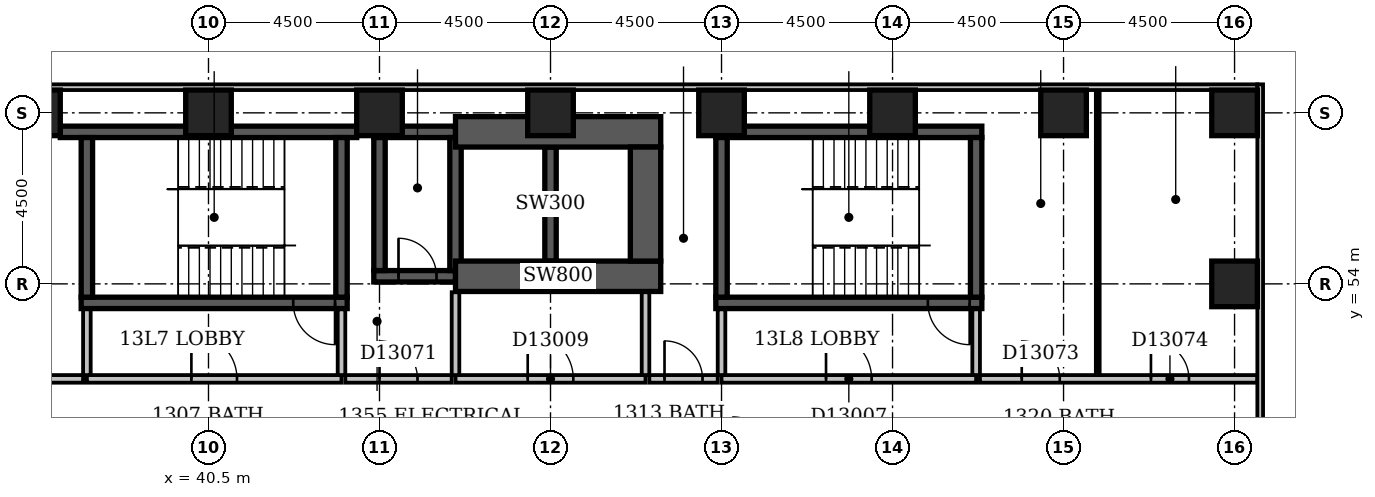
"""IFC4 building model, lengths in metres.
Left out: names, types, materials, properties, quantities, classifications, styles, units other than length and angle.
Written with IfcOpenShell. Run it as: python <this file> out.ifc"""

import sys

from ifc_helpers import new_model, si_unit, direction, frame, frame_2d, origin, origin_2d, place, context, subcontext, project, spatial, rectangle, extrude, element, fill, save


model = new_model("IFC4")
c1 = context("Model", 3, precision=1e-05, world=origin(), true_north=direction((0.0, 1.0)))
c2 = subcontext(c1, "Body", "Model", "MODEL_VIEW")
j1 = project(units=[si_unit("LENGTHUNIT", "METRE"), si_unit("PLANEANGLEUNIT", "RADIAN")], contexts=[c1])
p1 = place(None, origin())
s1 = spatial("IfcSite", under=j1, at=p1, CompositionType="ELEMENT")
p2 = place(p1, origin())
s2 = spatial("IfcBuilding", under=s1, at=p2, CompositionType="ELEMENT")
p3 = place(p2, frame((0.0, 0.0, 57.8)))
s3 = spatial("IfcBuildingStorey", under=s2, at=p3, CompositionType="ELEMENT", Elevation=57.8)
p4 = place(p3, frame((36.6, 58.0, -0.3), z_axis=(0.0, 0.0, 1.0), x_axis=(1.0, 0.0, 0.0)))
e1 = element("IfcWall", 1, at=p4, inside=s3, PredefinedType="SHEAR", context=c2, shape_type="SweptSolid", body=[
    extrude(rectangle(XDim=7.8, YDim=0.3, at=frame_2d((3.9, 0.0))), origin(), (0.0, 0.0, 1.0), 3.6),
])
p5 = place(p3, frame((37.15, 53.5, -0.3), z_axis=(0.0, 0.0, 1.0), x_axis=(1.0, 0.0, 0.0)))
e2 = element("IfcWall", 2, at=p5, inside=s3, PredefinedType="SHEAR", context=c2, shape_type="SweptSolid", body=[
    extrude(rectangle(XDim=7.0, YDim=0.3, at=frame_2d((3.5, 0.0))), origin(), (0.0, 0.0, 1.0), 3.6),
])
p6 = place(p5, frame((5.58, 0.0, 0.3)))
e3 = element("IfcOpeningElement", 3, at=p6, cuts=e2, PredefinedType="OPENING", context=c2, shape_type="SweptSolid", body=[
    extrude(rectangle(XDim=1.1, YDim=2.1, at=frame_2d((0.55, 1.05))), frame((0.0, 0.162, 0.0), z_axis=(0.0, -1.0, 0.0), x_axis=(1.0, 0.0, 0.0)), (0.0, 0.0, 1.0), 0.324),
])
for number, where, z_axis, x_axis in (
    (4, (37.3, 53.65, -0.3), (0.0, 0.0, 1.0), (0.0, 1.0, 0.0)),
    (5, (44.0, 53.65, -0.3), (0.0, 0.0, 1.0), (0.0, 1.0, 0.0)),
):
    element("IfcWall", number, at=place(p3, frame(where, z_axis=z_axis, x_axis=x_axis)), inside=s3, PredefinedType="SHEAR", context=c2, shape_type="SweptSolid", body=[
        extrude(rectangle(XDim=4.2, YDim=0.3, at=frame_2d((2.1, 0.0))), origin(), (0.0, 0.0, 1.0), 3.6),
    ])
p7 = place(p3, frame((44.85, 54.2, -0.3), z_axis=(0.0, 0.0, 1.0), x_axis=(1.0, 0.0, 0.0)))
e6 = element("IfcWall", 6, at=p7, inside=s3, PredefinedType="SHEAR", context=c2, shape_type="SweptSolid", body=[
    extrude(rectangle(XDim=2.15, YDim=0.3, at=frame_2d((1.075, 0.0))), origin(), (0.0, 0.0, 1.0), 3.6),
])
p8 = place(p7, frame((0.65, 0.0, 0.3)))
e7 = element("IfcOpeningElement", 7, at=p8, cuts=e6, PredefinedType="OPENING", context=c2, shape_type="SweptSolid", body=[
    extrude(rectangle(XDim=1.0, YDim=2.1, at=frame_2d((0.5, 1.05))), frame((0.0, 0.162, 0.0), z_axis=(0.0, -1.0, 0.0), x_axis=(1.0, 0.0, 0.0)), (0.0, 0.0, 1.0), 0.324),
])
p9 = place(p3, frame((44.85, 58.0, -0.3), z_axis=(0.0, 0.0, 1.0), x_axis=(1.0, 0.0, 0.0)))
e8 = element("IfcWall", 8, at=p9, inside=s3, PredefinedType="SHEAR", context=c2, shape_type="SweptSolid", body=[
    extrude(rectangle(XDim=2.15, YDim=0.3, at=frame_2d((1.075, 0.0))), origin(), (0.0, 0.0, 1.0), 3.6),
])
p10 = place(p3, frame((45.0, 54.35, -0.3), z_axis=(0.0, 0.0, 1.0), x_axis=(0.0, 1.0, 0.0)))
e9 = element("IfcWall", 9, at=p10, inside=s3, PredefinedType="SHEAR", context=c2, shape_type="SweptSolid", body=[
    extrude(rectangle(XDim=3.5, YDim=0.3, at=frame_2d((1.75, 0.0))), origin(), (0.0, 0.0, 1.0), 3.6),
])
p11 = place(p3, frame((47.0, 54.2, -0.3), z_axis=(0.0, 0.0, 1.0), x_axis=(1.0, 0.0, 0.0)))
e10 = element("IfcWall", 10, at=p11, inside=s3, PredefinedType="SHEAR", context=c2, shape_type="SweptSolid", body=[
    extrude(rectangle(XDim=5.4, YDim=0.8, at=frame_2d((2.7, 0.0))), origin(), (0.0, 0.0, 1.0), 3.6),
])
p12 = place(p3, frame((47.0, 54.35, -0.3), z_axis=(0.0, 0.0, 1.0), x_axis=(0.0, 1.0, 0.0)))
e11 = element("IfcWall", 11, at=p12, inside=s3, PredefinedType="SHEAR", context=c2, shape_type="SweptSolid", body=[
    extrude(rectangle(XDim=3.5, YDim=0.3, at=frame_2d((1.75, 0.0))), origin(), (0.0, 0.0, 1.0), 3.6),
])
p13 = place(p3, frame((47.0, 58.0, -0.3), z_axis=(0.0, 0.0, 1.0), x_axis=(1.0, 0.0, 0.0)))
e12 = element("IfcWall", 12, at=p13, inside=s3, PredefinedType="SHEAR", context=c2, shape_type="SweptSolid", body=[
    extrude(rectangle(XDim=5.4, YDim=0.8, at=frame_2d((2.7, 0.0))), origin(), (0.0, 0.0, 1.0), 3.6),
])
p14 = place(p3, frame((49.5, 54.6, -0.3), z_axis=(0.0, 0.0, 1.0), x_axis=(0.0, 1.0, 0.0)))
e13 = element("IfcWall", 13, at=p14, inside=s3, PredefinedType="SHEAR", context=c2, shape_type="SweptSolid", body=[
    extrude(rectangle(XDim=3.0, YDim=0.3, at=frame_2d((1.5, 0.0))), origin(), (0.0, 0.0, 1.0), 3.6),
])
p15 = place(p3, frame((52.0, 54.6, -0.3), z_axis=(0.0, 0.0, 1.0), x_axis=(0.0, 1.0, 0.0)))
e14 = element("IfcWall", 14, at=p15, inside=s3, PredefinedType="SHEAR", context=c2, shape_type="SweptSolid", body=[
    extrude(rectangle(XDim=3.0, YDim=0.8, at=frame_2d((1.5, 0.0))), origin(), (0.0, 0.0, 1.0), 3.6),
])
p16 = place(p3, frame((53.85, 53.5, -0.3), z_axis=(0.0, 0.0, 1.0), x_axis=(1.0, 0.0, 0.0)))
e15 = element("IfcWall", 15, at=p16, inside=s3, PredefinedType="SHEAR", context=c2, shape_type="SweptSolid", body=[
    extrude(rectangle(XDim=7.0, YDim=0.3, at=frame_2d((3.5, 0.0))), origin(), (0.0, 0.0, 1.0), 3.6),
])
p17 = place(p16, frame((5.58, 0.0, 0.3)))
e16 = element("IfcOpeningElement", 16, at=p17, cuts=e15, PredefinedType="OPENING", context=c2, shape_type="SweptSolid", body=[
    extrude(rectangle(XDim=1.1, YDim=2.1, at=frame_2d((0.55, 1.05))), frame((0.0, 0.162, 0.0), z_axis=(0.0, -1.0, 0.0), x_axis=(1.0, 0.0, 0.0)), (0.0, 0.0, 1.0), 0.324),
])
p18 = place(p3, frame((53.85, 58.0, -0.3), z_axis=(0.0, 0.0, 1.0), x_axis=(1.0, 0.0, 0.0)))
e17 = element("IfcWall", 17, at=p18, inside=s3, PredefinedType="SHEAR", context=c2, shape_type="SweptSolid", body=[
    extrude(rectangle(XDim=7.0, YDim=0.3, at=frame_2d((3.5, 0.0))), origin(), (0.0, 0.0, 1.0), 3.6),
])
for number, where, z_axis, x_axis in (
    (18, (54.0, 53.65, -0.3), (0.0, 0.0, 1.0), (0.0, 1.0, 0.0)),
    (19, (60.7, 53.65, -0.3), (0.0, 0.0, 1.0), (0.0, 1.0, 0.0)),
):
    element("IfcWall", number, at=place(p3, frame(where, z_axis=z_axis, x_axis=x_axis)), inside=s3, PredefinedType="SHEAR", context=c2, shape_type="SweptSolid", body=[
        extrude(rectangle(XDim=4.2, YDim=0.3, at=frame_2d((2.1, 0.0))), origin(), (0.0, 0.0, 1.0), 3.6),
    ])
for number, where, z_axis, x_axis in (
    (20, (67.5, 54.0, -0.3), (0.0, 0.0, 1.0), (1.0, 0.0, 0.0)),
    (21, (36.0, 58.5, -0.3), (0.0, 0.0, 1.0), (1.0, 0.0, 0.0)),
    (22, (40.5, 58.5, -0.3), (0.0, 0.0, 1.0), (1.0, 0.0, 0.0)),
    (23, (45.0, 58.5, -0.3), (0.0, 0.0, 1.0), (1.0, 0.0, 0.0)),
    (24, (49.5, 58.5, -0.3), (0.0, 0.0, 1.0), (1.0, 0.0, 0.0)),
    (25, (54.0, 58.5, -0.3), (0.0, 0.0, 1.0), (1.0, 0.0, 0.0)),
    (26, (58.5, 58.5, -0.3), (0.0, 0.0, 1.0), (1.0, 0.0, 0.0)),
    (27, (63.0, 58.5, -0.3), (0.0, 0.0, 1.0), (1.0, 0.0, 0.0)),
    (28, (67.5, 58.5, -0.3), (0.0, 0.0, 1.0), (1.0, 0.0, 0.0)),
):
    element("IfcColumn", number, at=place(p3, frame(where, z_axis=z_axis, x_axis=x_axis)), inside=s3, PredefinedType="COLUMN", context=c2, shape_type="SweptSolid", body=[
        extrude(rectangle(XDim=1.2, YDim=1.2, at=origin_2d()), origin(), (0.0, 0.0, 1.0), 3.6),
    ])
p19 = place(p3, frame((68.175, 35.4, 0.0), z_axis=(0.0, 0.0, 1.0), x_axis=(0.0, 1.0, 0.0)))
e29 = element("IfcWall", 29, at=p19, inside=s3, PredefinedType="STANDARD", context=c2, shape_type="SweptSolid", body=[
    extrude(rectangle(XDim=23.85, YDim=0.15, at=frame_2d((11.925, 0.0))), origin(), (0.0, 0.0, 1.0), 2.7),
])
p20 = place(p19, frame((1.65, 0.0, 0.6)))
e30 = element("IfcOpeningElement", 30, at=p20, cuts=e29, PredefinedType="OPENING", context=c2, shape_type="SweptSolid", body=[
    extrude(rectangle(XDim=2.4, YDim=1.8, at=frame_2d((1.2, 0.9))), frame((0.0, 0.087, 0.0), z_axis=(0.0, -1.0, 0.0), x_axis=(1.0, 0.0, 0.0)), (0.0, 0.0, 1.0), 0.174),
])
p21 = place(p19, frame((7.477, 0.0, 0.6)))
e31 = element("IfcOpeningElement", 31, at=p21, cuts=e29, PredefinedType="OPENING", context=c2, shape_type="SweptSolid", body=[
    extrude(rectangle(XDim=1.2, YDim=1.8, at=frame_2d((0.6, 0.9))), frame((0.0, 0.087, 0.0), z_axis=(0.0, -1.0, 0.0), x_axis=(1.0, 0.0, 0.0)), (0.0, 0.0, 1.0), 0.174),
])
p22 = place(p3, frame((68.1, 59.175, 0.0), z_axis=(0.0, 0.0, 1.0), x_axis=(-1.0, 0.0, 0.0)))
e32 = element("IfcWall", 32, at=p22, inside=s3, PredefinedType="STANDARD", context=c2, shape_type="SweptSolid", body=[
    extrude(rectangle(XDim=68.85, YDim=0.15, at=frame_2d((34.425, 0.0))), origin(), (0.0, 0.0, 1.0), 2.7),
])
p23 = place(p22, frame((37.65, 0.0, 0.6)))
e33 = element("IfcOpeningElement", 33, at=p23, cuts=e32, PredefinedType="OPENING", context=c2, shape_type="SweptSolid", body=[
    extrude(rectangle(XDim=2.4, YDim=1.8, at=frame_2d((1.2, 0.9))), frame((0.0, 0.087, 0.0), z_axis=(0.0, -1.0, 0.0), x_axis=(1.0, 0.0, 0.0)), (0.0, 0.0, 1.0), 0.174),
])
p24 = place(p3, frame((47.0, 51.5, 0.0), z_axis=(0.0, 0.0, 1.0), x_axis=(1.0, 0.0, 0.0)))
e34 = element("IfcWall", 34, at=p24, inside=s3, PredefinedType="PARTITIONING", context=c2, shape_type="SweptSolid", body=[
    extrude(rectangle(XDim=5.0, YDim=0.2, at=frame_2d((2.5, 0.0))), origin(), (0.0, 0.0, 1.0), 3.3),
])
p25 = place(p24, frame((1.9, 0.0, 0.0)))
e35 = element("IfcOpeningElement", 35, at=p25, cuts=e34, PredefinedType="OPENING", context=c2, shape_type="SweptSolid", body=[
    extrude(rectangle(XDim=1.2, YDim=2.1, at=frame_2d((0.6, 1.05))), frame((0.0, 0.112, 0.0), z_axis=(0.0, -1.0, 0.0), x_axis=(1.0, 0.0, 0.0)), (0.0, 0.0, 1.0), 0.224),
])
for number, where, z_axis, x_axis in (
    (36, (52.0, 51.6, 0.0), (0.0, 0.0, 1.0), (0.0, 1.0, 0.0)),
    (37, (47.0, 51.6, 0.0), (0.0, 0.0, 1.0), (0.0, 1.0, 0.0)),
):
    element("IfcWall", number, at=place(p3, frame(where, z_axis=z_axis, x_axis=x_axis)), inside=s3, PredefinedType="PARTITIONING", context=c2, shape_type="SweptSolid", body=[
        extrude(rectangle(XDim=2.18, YDim=0.2, at=frame_2d((1.09, 0.0))), origin(), (0.0, 0.0, 1.0), 3.3),
    ])
p26 = place(p3, frame((37.3, 51.5, 0.0), z_axis=(0.0, 0.0, 1.0), x_axis=(1.0, 0.0, 0.0)))
e38 = element("IfcWall", 38, at=p26, inside=s3, PredefinedType="PARTITIONING", context=c2, shape_type="SweptSolid", body=[
    extrude(rectangle(XDim=6.7, YDim=0.2, at=frame_2d((3.35, 0.0))), origin(), (0.0, 0.0, 1.0), 3.3),
])
p27 = place(p26, frame((2.75, 0.0, 0.0)))
e39 = element("IfcOpeningElement", 39, at=p27, cuts=e38, PredefinedType="OPENING", context=c2, shape_type="SweptSolid", body=[
    extrude(rectangle(XDim=1.2, YDim=2.1, at=frame_2d((0.6, 1.05))), frame((0.0, 0.112, 0.0), z_axis=(0.0, -1.0, 0.0), x_axis=(1.0, 0.0, 0.0)), (0.0, 0.0, 1.0), 0.224),
])
for number, where, z_axis, x_axis in (
    (40, (44.0, 51.6, 0.0), (0.0, 0.0, 1.0), (0.0, 1.0, 0.0)),
    (41, (37.3, 51.6, 0.0), (0.0, 0.0, 1.0), (0.0, 1.0, 0.0)),
):
    element("IfcWall", number, at=place(p3, frame(where, z_axis=z_axis, x_axis=x_axis)), inside=s3, PredefinedType="PARTITIONING", context=c2, shape_type="SweptSolid", body=[
        extrude(rectangle(XDim=1.73, YDim=0.2, at=frame_2d((0.865, 0.0))), origin(), (0.0, 0.0, 1.0), 3.3),
    ])
p28 = place(p3, frame((54.0, 51.5, 0.0), z_axis=(0.0, 0.0, 1.0), x_axis=(1.0, 0.0, 0.0)))
e42 = element("IfcWall", 42, at=p28, inside=s3, PredefinedType="PARTITIONING", context=c2, shape_type="SweptSolid", body=[
    extrude(rectangle(XDim=6.7, YDim=0.2, at=frame_2d((3.35, 0.0))), origin(), (0.0, 0.0, 1.0), 3.3),
])
p29 = place(p28, frame((2.75, 0.0, 0.0)))
e43 = element("IfcOpeningElement", 43, at=p29, cuts=e42, PredefinedType="OPENING", context=c2, shape_type="SweptSolid", body=[
    extrude(rectangle(XDim=1.2, YDim=2.1, at=frame_2d((0.6, 1.05))), frame((0.0, 0.112, 0.0), z_axis=(0.0, -1.0, 0.0), x_axis=(1.0, 0.0, 0.0)), (0.0, 0.0, 1.0), 0.224),
])
p30 = place(p3, frame((60.7, 51.6, 0.0), z_axis=(0.0, 0.0, 1.0), x_axis=(0.0, 1.0, 0.0)))
e44 = element("IfcWall", 44, at=p30, inside=s3, PredefinedType="PARTITIONING", context=c2, shape_type="SweptSolid", body=[
    extrude(rectangle(XDim=1.73, YDim=0.2, at=frame_2d((0.865, 0.0))), origin(), (0.0, 0.0, 1.0), 3.3),
])
p31 = place(p3, frame((54.0, 51.6, 0.0), z_axis=(0.0, 0.0, 1.0), x_axis=(0.0, 1.0, 0.0)))
e45 = element("IfcWall", 45, at=p31, inside=s3, PredefinedType="PARTITIONING", context=c2, shape_type="SweptSolid", body=[
    extrude(rectangle(XDim=1.73, YDim=0.2, at=frame_2d((0.865, 0.0))), origin(), (0.0, 0.0, 1.0), 2.6),
])
p32 = place(p3, frame((27.9, 51.5, 0.0), z_axis=(0.0, 0.0, 1.0), x_axis=(1.0, 0.0, 0.0)))
e46 = element("IfcWall", 46, at=p32, inside=s3, PredefinedType="PARTITIONING", context=c2, shape_type="SweptSolid", body=[
    extrude(rectangle(XDim=9.3, YDim=0.2, at=frame_2d((4.65, 0.0))), origin(), (0.0, 0.0, 1.0), 3.3),
])
p33 = place(p32, frame((4.2, 0.0, 0.0)))
e47 = element("IfcOpeningElement", 47, at=p33, cuts=e46, PredefinedType="OPENING", context=c2, shape_type="SweptSolid", body=[
    extrude(rectangle(XDim=0.9, YDim=2.1, at=frame_2d((0.45, 1.05))), frame((0.0, 0.112, 0.0), z_axis=(0.0, -1.0, 0.0), x_axis=(1.0, 0.0, 0.0)), (0.0, 0.0, 1.0), 0.224),
])
p34 = place(p3, frame((44.1, 51.5, 0.0), z_axis=(0.0, 0.0, 1.0), x_axis=(1.0, 0.0, 0.0)))
e48 = element("IfcWall", 48, at=p34, inside=s3, PredefinedType="PARTITIONING", context=c2, shape_type="SweptSolid", body=[
    extrude(rectangle(XDim=2.8, YDim=0.2, at=frame_2d((1.4, 0.0))), origin(), (0.0, 0.0, 1.0), 3.3),
])
p35 = place(p34, frame((0.9, 0.0, 0.0)))
e49 = element("IfcOpeningElement", 49, at=p35, cuts=e48, PredefinedType="OPENING", context=c2, shape_type="SweptSolid", body=[
    extrude(rectangle(XDim=1.0, YDim=2.1, at=frame_2d((0.5, 1.05))), frame((0.0, 0.112, 0.0), z_axis=(0.0, -1.0, 0.0), x_axis=(1.0, 0.0, 0.0)), (0.0, 0.0, 1.0), 0.224),
])
p36 = place(p3, frame((52.1, 51.5, 0.0), z_axis=(0.0, 0.0, 1.0), x_axis=(1.0, 0.0, 0.0)))
e50 = element("IfcWall", 50, at=p36, inside=s3, PredefinedType="PARTITIONING", context=c2, shape_type="SweptSolid", body=[
    extrude(rectangle(XDim=1.8, YDim=0.2, at=frame_2d((0.9, 0.0))), origin(), (0.0, 0.0, 1.0), 3.3),
])
p37 = place(p36, frame((0.4, 0.0, 0.0)))
e51 = element("IfcOpeningElement", 51, at=p37, cuts=e50, PredefinedType="OPENING", context=c2, shape_type="SweptSolid", body=[
    extrude(rectangle(XDim=1.0, YDim=2.1, at=frame_2d((0.5, 1.05))), frame((0.0, 0.112, 0.0), z_axis=(0.0, -1.0, 0.0), x_axis=(1.0, 0.0, 0.0)), (0.0, 0.0, 1.0), 0.224),
])
p38 = place(p3, frame((60.8, 51.5, 0.0), z_axis=(0.0, 0.0, 1.0), x_axis=(1.0, 0.0, 0.0)))
e52 = element("IfcWall", 52, at=p38, inside=s3, PredefinedType="PARTITIONING", context=c2, shape_type="SweptSolid", body=[
    extrude(rectangle(XDim=7.3, YDim=0.2, at=frame_2d((3.65, 0.0))), origin(), (0.0, 0.0, 1.0), 3.3),
])
p39 = place(p38, frame((1.1, 0.0, 0.0)))
e53 = element("IfcOpeningElement", 53, at=p39, cuts=e52, PredefinedType="OPENING", context=c2, shape_type="SweptSolid", body=[
    extrude(rectangle(XDim=1.0, YDim=2.1, at=frame_2d((0.5, 1.05))), frame((0.0, 0.112, 0.0), z_axis=(0.0, -1.0, 0.0), x_axis=(1.0, 0.0, 0.0)), (0.0, 0.0, 1.0), 0.224),
])
p40 = place(p38, frame((4.5, 0.0, 0.0)))
e54 = element("IfcOpeningElement", 54, at=p40, cuts=e52, PredefinedType="OPENING", context=c2, shape_type="SweptSolid", body=[
    extrude(rectangle(XDim=1.0, YDim=2.1, at=frame_2d((0.5, 1.05))), frame((0.0, 0.112, 0.0), z_axis=(0.0, -1.0, 0.0), x_axis=(1.0, 0.0, 0.0)), (0.0, 0.0, 1.0), 0.224),
])
p41 = place(p3, frame((63.9, 51.6, 0.0), z_axis=(0.0, 0.0, 1.0), x_axis=(0.0, 1.0, 0.0)))
e55 = element("IfcWall", 55, at=p41, inside=s3, PredefinedType="PARTITIONING", context=c2, shape_type="SweptSolid", body=[
    extrude(rectangle(XDim=7.5, YDim=0.1, at=frame_2d((3.75, 0.0))), origin(), (0.0, 0.0, 1.0), 3.3),
])
p42 = place(p27, origin())
e56 = element("IfcDoor", 56, at=p42, inside=s3, OperationType="SINGLE_SWING_LEFT", PredefinedType="DOOR", context=c2, shape_type="SweptSolid", body=[
    extrude(rectangle(XDim=1.2, YDim=2.1, at=frame_2d((0.6, 1.05))), frame((0.0, 0.025, 0.0), z_axis=(0.0, -1.0, 0.0), x_axis=(1.0, 0.0, 0.0)), (0.0, 0.0, 1.0), 0.05),
])
fill(e39, e56)
p43 = place(p29, origin())
e57 = element("IfcDoor", 57, at=p43, inside=s3, OperationType="SINGLE_SWING_LEFT", PredefinedType="DOOR", context=c2, shape_type="SweptSolid", body=[
    extrude(rectangle(XDim=1.2, YDim=2.1, at=frame_2d((0.6, 1.05))), frame((0.0, 0.025, 0.0), z_axis=(0.0, -1.0, 0.0), x_axis=(1.0, 0.0, 0.0)), (0.0, 0.0, 1.0), 0.05),
])
fill(e43, e57)
p44 = place(p25, origin())
e58 = element("IfcDoor", 58, at=p44, inside=s3, OperationType="SINGLE_SWING_LEFT", PredefinedType="DOOR", context=c2, shape_type="SweptSolid", body=[
    extrude(rectangle(XDim=1.2, YDim=2.1, at=frame_2d((0.6, 1.05))), frame((0.0, 0.025, 0.0), z_axis=(0.0, -1.0, 0.0), x_axis=(1.0, 0.0, 0.0)), (0.0, 0.0, 1.0), 0.05),
])
fill(e35, e58)
p45 = place(p8, origin())
e59 = element("IfcDoor", 59, at=p45, inside=s3, OperationType="SINGLE_SWING_LEFT", PredefinedType="DOOR", context=c2, shape_type="SweptSolid", body=[
    extrude(rectangle(XDim=1.0, YDim=2.1, at=frame_2d((0.5, 1.05))), frame((0.0, 0.025, 0.0), z_axis=(0.0, -1.0, 0.0), x_axis=(1.0, 0.0, 0.0)), (0.0, 0.0, 1.0), 0.05),
])
fill(e7, e59)
p46 = place(p6, origin())
e60 = element("IfcDoor", 60, at=p46, inside=s3, OperationType="SINGLE_SWING_RIGHT", PredefinedType="DOOR", context=c2, shape_type="SweptSolid", body=[
    extrude(rectangle(XDim=1.1, YDim=2.1, at=frame_2d((0.55, 1.05))), frame((0.0, 0.025, 0.0), z_axis=(0.0, -1.0, 0.0), x_axis=(1.0, 0.0, 0.0)), (0.0, 0.0, 1.0), 0.05),
])
fill(e3, e60)
p47 = place(p17, origin())
e61 = element("IfcDoor", 61, at=p47, inside=s3, OperationType="SINGLE_SWING_RIGHT", PredefinedType="DOOR", context=c2, shape_type="SweptSolid", body=[
    extrude(rectangle(XDim=1.1, YDim=2.1, at=frame_2d((0.55, 1.05))), frame((0.0, 0.025, 0.0), z_axis=(0.0, -1.0, 0.0), x_axis=(1.0, 0.0, 0.0)), (0.0, 0.0, 1.0), 0.05),
])
fill(e16, e61)
p48 = place(p35, origin())
e62 = element("IfcDoor", 62, at=p48, inside=s3, OperationType="SINGLE_SWING_LEFT", PredefinedType="DOOR", context=c2, shape_type="SweptSolid", body=[
    extrude(rectangle(XDim=1.0, YDim=2.1, at=frame_2d((0.5, 1.05))), frame((0.0, 0.025, 0.0), z_axis=(0.0, -1.0, 0.0), x_axis=(1.0, 0.0, 0.0)), (0.0, 0.0, 1.0), 0.05),
])
fill(e49, e62)
p49 = place(p37, origin())
e63 = element("IfcDoor", 63, at=p49, inside=s3, OperationType="SINGLE_SWING_LEFT", PredefinedType="DOOR", context=c2, shape_type="SweptSolid", body=[
    extrude(rectangle(XDim=1.0, YDim=2.1, at=frame_2d((0.5, 1.05))), frame((0.0, 0.025, 0.0), z_axis=(0.0, -1.0, 0.0), x_axis=(1.0, 0.0, 0.0)), (0.0, 0.0, 1.0), 0.05),
])
fill(e51, e63)
p50 = place(p39, origin())
e64 = element("IfcDoor", 64, at=p50, inside=s3, OperationType="SINGLE_SWING_LEFT", PredefinedType="DOOR", context=c2, shape_type="SweptSolid", body=[
    extrude(rectangle(XDim=1.0, YDim=2.1, at=frame_2d((0.5, 1.05))), frame((0.0, 0.025, 0.0), z_axis=(0.0, -1.0, 0.0), x_axis=(1.0, 0.0, 0.0)), (0.0, 0.0, 1.0), 0.05),
])
fill(e53, e64)
p51 = place(p40, origin())
e65 = element("IfcDoor", 65, at=p51, inside=s3, OperationType="SINGLE_SWING_LEFT", PredefinedType="DOOR", context=c2, shape_type="SweptSolid", body=[
    extrude(rectangle(XDim=1.0, YDim=2.1, at=frame_2d((0.5, 1.05))), frame((0.0, 0.025, 0.0), z_axis=(0.0, -1.0, 0.0), x_axis=(1.0, 0.0, 0.0)), (0.0, 0.0, 1.0), 0.05),
])
fill(e54, e65)
save(model, sys.argv[1])
